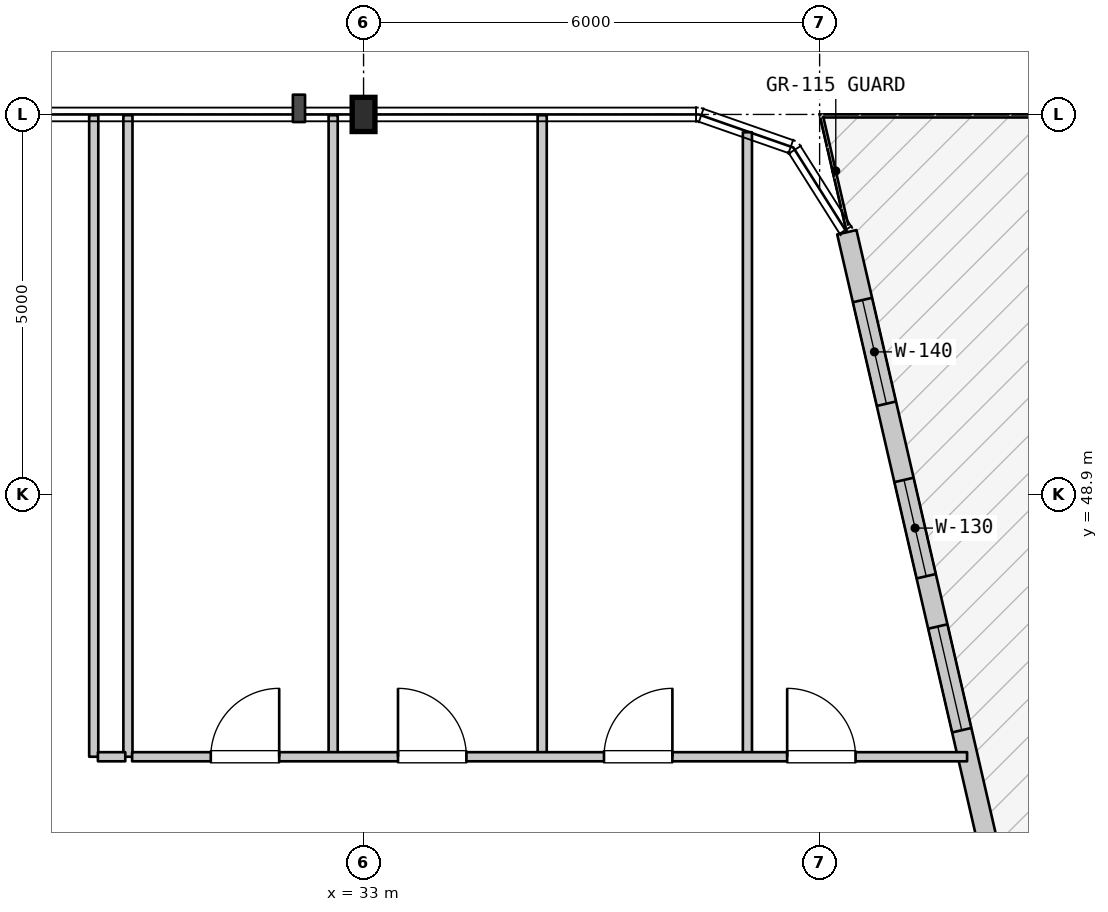
"""IFC4 building model, lengths in metres.
Left out: names, types, materials, properties, quantities, classifications, styles, units other than length and angle.
Written with IfcOpenShell. Run it as: python <this file> out.ifc"""

import sys

from ifc_helpers import new_model, si_unit, direction, frame, frame_2d, origin, origin_2d, place, context, subcontext, project, spatial, rectangle, i_section, extrude, element, fill, save


model = new_model("IFC4")
c1 = context("Model", 3, precision=1e-05, world=origin(), true_north=direction((0.0, 1.0)))
c2 = subcontext(c1, "Body", "Model", "MODEL_VIEW")
j1 = project(units=[si_unit("LENGTHUNIT", "METRE"), si_unit("PLANEANGLEUNIT", "RADIAN")], contexts=[c1])
p1 = place(None, origin())
s1 = spatial("IfcSite", under=j1, at=p1, CompositionType="ELEMENT")
p2 = place(p1, origin())
s2 = spatial("IfcBuilding", under=s1, at=p2, CompositionType="ELEMENT")
p3 = place(p2, frame((0.0, 0.0, 164.6)))
s3 = spatial("IfcBuildingStorey", under=s2, at=p3, CompositionType="ELEMENT", Elevation=164.6)
p4 = place(p3, frame((33.0, 53.9, 0.0), z_axis=(0.0, 0.0, 1.0), x_axis=(1.0, 0.0, 0.0)))
e1 = element("IfcColumn", 1, at=p4, inside=s3, PredefinedType="COLUMN", context=c2, shape_type="SweptSolid", body=[
    extrude(i_section(OverallWidth=0.3, OverallDepth=0.45, WebThickness=0.014, FlangeThickness=0.026, FilletRadius=0.027, at=origin_2d()), origin(), (0.0, 0.0, 1.0), 4.5),
])
p5 = place(p3, frame((39.358, 52.35, 0.0), z_axis=(0.0, 0.0, 1.0), x_axis=(0.224849558511, -0.974393491377, 0.0)))
e2 = element("IfcWall", 2, at=p5, inside=s3, PredefinedType="STANDARD", context=c2, shape_type="SweptSolid", body=[
    extrude(rectangle(XDim=25.093, YDim=0.26, at=frame_2d((12.546, 0.0))), origin(), (0.0, 0.0, 1.0), 4.19),
])
p6 = place(p5, frame((16.689, 0.0, 0.0)))
e3 = element("IfcOpeningElement", 3, at=p6, cuts=e2, PredefinedType="OPENING", context=c2, shape_type="SweptSolid", body=[
    extrude(rectangle(XDim=1.4, YDim=2.2, at=frame_2d((0.7, 1.1))), frame((0.0, 0.14, 0.0), z_axis=(0.0, -1.0, 0.0), x_axis=(1.0, 0.0, 0.0)), (0.0, 0.0, 1.0), 0.28),
])
p7 = place(p5, frame((0.915, 0.0, 0.9)))
e4 = element("IfcOpeningElement", 4, at=p7, cuts=e2, PredefinedType="OPENING", context=c2, shape_type="SweptSolid", body=[
    extrude(rectangle(XDim=1.4, YDim=1.85, at=frame_2d((0.7, 0.925))), frame((0.0, 0.14, 0.0), z_axis=(0.0, -1.0, 0.0), x_axis=(1.0, 0.0, 0.0)), (0.0, 0.0, 1.0), 0.28),
])
p8 = place(p5, frame((3.344, 0.0, 0.9)))
e5 = element("IfcOpeningElement", 5, at=p8, cuts=e2, PredefinedType="OPENING", context=c2, shape_type="SweptSolid", body=[
    extrude(rectangle(XDim=1.3, YDim=1.9, at=frame_2d((0.65, 0.95))), frame((0.0, 0.14, 0.0), z_axis=(0.0, -1.0, 0.0), x_axis=(1.0, 0.0, 0.0)), (0.0, 0.0, 1.0), 0.28),
])
p9 = place(p5, frame((5.323, 0.0, 0.9)))
e6 = element("IfcOpeningElement", 6, at=p9, cuts=e2, PredefinedType="OPENING", context=c2, shape_type="SweptSolid", body=[
    extrude(rectangle(XDim=1.4, YDim=1.85, at=frame_2d((0.7, 0.925))), frame((0.0, 0.14, 0.0), z_axis=(0.0, -1.0, 0.0), x_axis=(1.0, 0.0, 0.0)), (0.0, 0.0, 1.0), 0.28),
])
p10 = place(p5, frame((8.202, 0.0, 0.9)))
e7 = element("IfcOpeningElement", 7, at=p10, cuts=e2, PredefinedType="OPENING", context=c2, shape_type="SweptSolid", body=[
    extrude(rectangle(XDim=1.3, YDim=1.9, at=frame_2d((0.65, 0.95))), frame((0.0, 0.14, 0.0), z_axis=(0.0, -1.0, 0.0), x_axis=(1.0, 0.0, 0.0)), (0.0, 0.0, 1.0), 0.28),
])
p11 = place(p5, frame((10.632, 0.0, 0.9)))
e8 = element("IfcOpeningElement", 8, at=p11, cuts=e2, PredefinedType="OPENING", context=c2, shape_type="SweptSolid", body=[
    extrude(rectangle(XDim=1.4, YDim=1.85, at=frame_2d((0.7, 0.925))), frame((0.0, 0.14, 0.0), z_axis=(0.0, -1.0, 0.0), x_axis=(1.0, 0.0, 0.0)), (0.0, 0.0, 1.0), 0.28),
])
p12 = place(p5, frame((13.061, 0.0, 0.9)))
e9 = element("IfcOpeningElement", 9, at=p12, cuts=e2, PredefinedType="OPENING", context=c2, shape_type="SweptSolid", body=[
    extrude(rectangle(XDim=1.3, YDim=1.9, at=frame_2d((0.65, 0.95))), frame((0.0, 0.14, 0.0), z_axis=(0.0, -1.0, 0.0), x_axis=(1.0, 0.0, 0.0)), (0.0, 0.0, 1.0), 0.28),
])
p13 = place(p5, frame((18.369, 0.0, 0.9)))
e10 = element("IfcOpeningElement", 10, at=p13, cuts=e2, PredefinedType="OPENING", context=c2, shape_type="SweptSolid", body=[
    extrude(rectangle(XDim=1.4, YDim=1.85, at=frame_2d((0.7, 0.925))), frame((0.0, 0.14, 0.0), z_axis=(0.0, -1.0, 0.0), x_axis=(1.0, 0.0, 0.0)), (0.0, 0.0, 1.0), 0.28),
])
p14 = place(p5, frame((20.799, 0.0, 0.9)))
e11 = element("IfcOpeningElement", 11, at=p14, cuts=e2, PredefinedType="OPENING", context=c2, shape_type="SweptSolid", body=[
    extrude(rectangle(XDim=1.3, YDim=1.9, at=frame_2d((0.65, 0.95))), frame((0.0, 0.14, 0.0), z_axis=(0.0, -1.0, 0.0), x_axis=(1.0, 0.0, 0.0)), (0.0, 0.0, 1.0), 0.28),
])
for number, where, z_axis, x_axis in (
    (12, (29.45, 45.45, 0.0), (0.0, 0.0, 1.0), (0.0, 1.0, 0.0)),
    (13, (29.9, 45.45, 0.0), (0.0, 0.0, 1.0), (0.0, 1.0, 0.0)),
    (14, (32.6, 45.45, 0.0), (0.0, 0.0, 1.0), (0.0, 1.0, 0.0)),
    (15, (35.35, 45.45, 0.0), (0.0, 0.0, 1.0), (0.0, 1.0, 0.0)),
):
    element("IfcWall", number, at=place(p3, frame(where, z_axis=z_axis, x_axis=x_axis)), inside=s3, PredefinedType="PARTITIONING", context=c2, shape_type="SweptSolid", body=[
        extrude(rectangle(XDim=8.44, YDim=0.12, at=frame_2d((4.22, 0.0))), origin(), (0.0, 0.0, 1.0), 4.19),
    ])
p15 = place(p3, frame((38.05, 45.45, 0.0), z_axis=(0.0, 0.0, 1.0), x_axis=(0.0, 1.0, 0.0)))
e16 = element("IfcWall", 16, at=p15, inside=s3, PredefinedType="PARTITIONING", context=c2, shape_type="SweptSolid", body=[
    extrude(rectangle(XDim=8.216, YDim=0.12, at=frame_2d((4.108, 0.0))), origin(), (0.0, 0.0, 1.0), 4.19),
])
p16 = place(p3, frame((29.505, 45.45, 0.0), z_axis=(0.0, 0.0, 1.0), x_axis=(1.0, 0.0, 0.0)))
e17 = element("IfcWall", 17, at=p16, inside=s3, PredefinedType="PARTITIONING", context=c2, shape_type="SweptSolid", body=[
    extrude(rectangle(XDim=0.36, YDim=0.12, at=frame_2d((0.18, 0.0))), origin(), (0.0, 0.0, 1.0), 4.19),
])
p17 = place(p3, frame((29.955, 45.45, 0.0), z_axis=(0.0, 0.0, 1.0), x_axis=(1.0, 0.0, 0.0)))
e18 = element("IfcWall", 18, at=p17, inside=s3, PredefinedType="PARTITIONING", context=c2, shape_type="SweptSolid", body=[
    extrude(rectangle(XDim=10.985, YDim=0.12, at=frame_2d((5.492, 0.0))), origin(), (0.0, 0.0, 1.0), 4.19),
])
p18 = place(p17, frame((1.035, 0.0, 0.0)))
e19 = element("IfcOpeningElement", 19, at=p18, cuts=e18, PredefinedType="OPENING", context=c2, shape_type="SweptSolid", body=[
    extrude(rectangle(XDim=0.9, YDim=2.15, at=frame_2d((0.45, 1.075))), frame((0.0, 0.07, 0.0), z_axis=(0.0, -1.0, 0.0), x_axis=(1.0, 0.0, 0.0)), (0.0, 0.0, 1.0), 0.14),
])
p19 = place(p17, frame((3.498, 0.0, 0.0)))
e20 = element("IfcOpeningElement", 20, at=p19, cuts=e18, PredefinedType="OPENING", context=c2, shape_type="SweptSolid", body=[
    extrude(rectangle(XDim=0.9, YDim=2.15, at=frame_2d((0.45, 1.075))), frame((0.0, 0.07, 0.0), z_axis=(0.0, -1.0, 0.0), x_axis=(1.0, 0.0, 0.0)), (0.0, 0.0, 1.0), 0.14),
])
p20 = place(p17, frame((6.208, 0.0, 0.0)))
e21 = element("IfcOpeningElement", 21, at=p20, cuts=e18, PredefinedType="OPENING", context=c2, shape_type="SweptSolid", body=[
    extrude(rectangle(XDim=0.9, YDim=2.15, at=frame_2d((0.45, 1.075))), frame((0.0, 0.07, 0.0), z_axis=(0.0, -1.0, 0.0), x_axis=(1.0, 0.0, 0.0)), (0.0, 0.0, 1.0), 0.14),
])
p21 = place(p17, frame((8.618, 0.0, 0.0)))
e22 = element("IfcOpeningElement", 22, at=p21, cuts=e18, PredefinedType="OPENING", context=c2, shape_type="SweptSolid", body=[
    extrude(rectangle(XDim=0.9, YDim=2.15, at=frame_2d((0.45, 1.075))), frame((0.0, 0.07, 0.0), z_axis=(0.0, -1.0, 0.0), x_axis=(1.0, 0.0, 0.0)), (0.0, 0.0, 1.0), 0.14),
])
p22 = place(p7, origin())
e23 = element("IfcWindow", 23, at=p22, inside=s3, PartitioningType="SINGLE_PANEL", PredefinedType="WINDOW", context=c2, shape_type="SweptSolid", body=[
    extrude(rectangle(XDim=1.4, YDim=1.85, at=frame_2d((0.7, 0.925))), frame((0.0, 0.03, 0.0), z_axis=(0.0, -1.0, 0.0), x_axis=(1.0, 0.0, 0.0)), (0.0, 0.0, 1.0), 0.06),
])
fill(e4, e23)
p23 = place(p8, origin())
e24 = element("IfcWindow", 24, at=p23, inside=s3, PartitioningType="SINGLE_PANEL", PredefinedType="WINDOW", context=c2, shape_type="SweptSolid", body=[
    extrude(rectangle(XDim=1.3, YDim=1.9, at=frame_2d((0.65, 0.95))), frame((0.0, 0.03, 0.0), z_axis=(0.0, -1.0, 0.0), x_axis=(1.0, 0.0, 0.0)), (0.0, 0.0, 1.0), 0.06),
])
fill(e5, e24)
p24 = place(p9, origin())
e25 = element("IfcWindow", 25, at=p24, inside=s3, PartitioningType="SINGLE_PANEL", PredefinedType="WINDOW", context=c2, shape_type="SweptSolid", body=[
    extrude(rectangle(XDim=1.4, YDim=1.85, at=frame_2d((0.7, 0.925))), frame((0.0, 0.03, 0.0), z_axis=(0.0, -1.0, 0.0), x_axis=(1.0, 0.0, 0.0)), (0.0, 0.0, 1.0), 0.06),
])
fill(e6, e25)
p25 = place(p18, origin())
e26 = element("IfcDoor", 26, at=p25, inside=s3, OperationType="SINGLE_SWING_RIGHT", PredefinedType="DOOR", context=c2, shape_type="SweptSolid", body=[
    extrude(rectangle(XDim=0.9, YDim=2.15, at=frame_2d((0.45, 1.075))), frame((0.0, 0.025, 0.0), z_axis=(0.0, -1.0, 0.0), x_axis=(1.0, 0.0, 0.0)), (0.0, 0.0, 1.0), 0.05),
])
fill(e19, e26)
p26 = place(p19, origin())
e27 = element("IfcDoor", 27, at=p26, inside=s3, OperationType="SINGLE_SWING_LEFT", PredefinedType="DOOR", context=c2, shape_type="SweptSolid", body=[
    extrude(rectangle(XDim=0.9, YDim=2.15, at=frame_2d((0.45, 1.075))), frame((0.0, 0.025, 0.0), z_axis=(0.0, -1.0, 0.0), x_axis=(1.0, 0.0, 0.0)), (0.0, 0.0, 1.0), 0.05),
])
fill(e20, e27)
p27 = place(p20, origin())
e28 = element("IfcDoor", 28, at=p27, inside=s3, OperationType="SINGLE_SWING_RIGHT", PredefinedType="DOOR", context=c2, shape_type="SweptSolid", body=[
    extrude(rectangle(XDim=0.9, YDim=2.15, at=frame_2d((0.45, 1.075))), frame((0.0, 0.025, 0.0), z_axis=(0.0, -1.0, 0.0), x_axis=(1.0, 0.0, 0.0)), (0.0, 0.0, 1.0), 0.05),
])
fill(e21, e28)
p28 = place(p21, origin())
e29 = element("IfcDoor", 29, at=p28, inside=s3, OperationType="SINGLE_SWING_LEFT", PredefinedType="DOOR", context=c2, shape_type="SweptSolid", body=[
    extrude(rectangle(XDim=0.9, YDim=2.15, at=frame_2d((0.45, 1.075))), frame((0.0, 0.025, 0.0), z_axis=(0.0, -1.0, 0.0), x_axis=(1.0, 0.0, 0.0)), (0.0, 0.0, 1.0), 0.05),
])
fill(e22, e29)
save(model, sys.argv[1])
